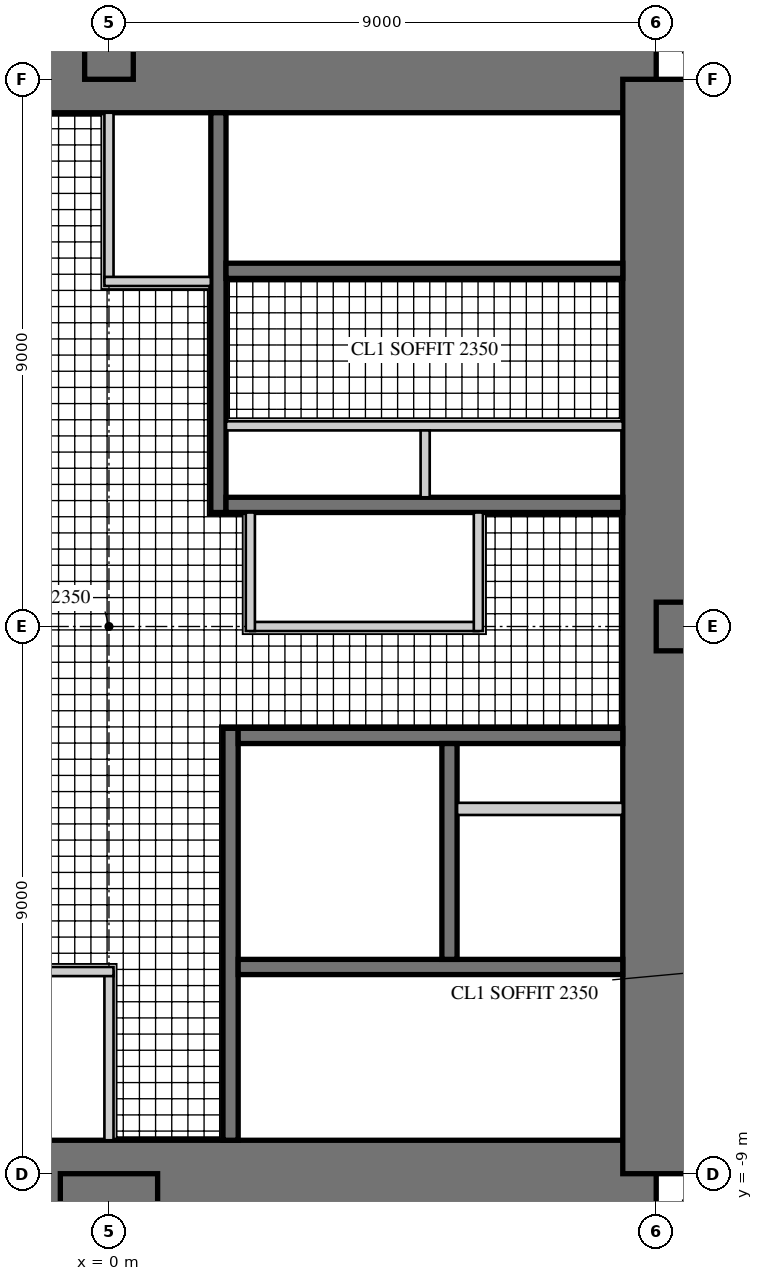
"""IFC4 building model, lengths in metres.
Left out: names, types, materials, properties, quantities, classifications, styles, units other than length and angle.
Written with IfcOpenShell. Run it as: python <this file> out.ifc"""

import sys

from ifc_helpers import new_model, si_unit, direction, frame, frame_2d, origin, place, context, subcontext, project, spatial, rectangle, extrude, element, fill, save


model = new_model("IFC4")
c1 = context("Model", 3, precision=1e-05, world=origin(), true_north=direction((0.0, 1.0)))
c2 = subcontext(c1, "Body", "Model", "MODEL_VIEW")
j1 = project(units=[si_unit("LENGTHUNIT", "METRE"), si_unit("PLANEANGLEUNIT", "RADIAN")], contexts=[c1])
p1 = place(None, origin())
s1 = spatial("IfcSite", under=j1, at=p1, CompositionType="ELEMENT")
p2 = place(p1, origin())
s2 = spatial("IfcBuilding", under=s1, at=p2, CompositionType="ELEMENT")
p3 = place(p2, frame((0.0, 0.0, 206.9)))
s3 = spatial("IfcBuildingStorey", under=s2, at=p3, CompositionType="ELEMENT", Elevation=206.9)
p4 = place(p3, frame((9.0, 9.0, 0.0), z_axis=(0.0, 0.0, 1.0), x_axis=(-1.0, 0.0, 0.0)))
e1 = element("IfcWall", 1, at=p4, inside=s3, PredefinedType="SHEAR", context=c2, shape_type="SweptSolid", body=[
    extrude(rectangle(XDim=18.0, YDim=1.1, at=frame_2d((9.0, 0.0))), origin(), (0.0, 0.0, 1.0), 3.4),
])
p5 = place(p4, frame((9.8, 0.0, 0.0)))
e2 = element("IfcOpeningElement", 2, at=p5, cuts=e1, PredefinedType="OPENING", context=c2, shape_type="SweptSolid", body=[
    extrude(rectangle(XDim=1.0, YDim=2.4, at=frame_2d((0.5, 1.2))), frame((0.0, 0.56, 0.0), z_axis=(0.0, -1.0, 0.0), x_axis=(1.0, 0.0, 0.0)), (0.0, 0.0, 1.0), 1.12),
])
p6 = place(p3, frame((-9.0, -9.0, 0.0), z_axis=(0.0, 0.0, 1.0), x_axis=(1.0, 0.0, 0.0)))
e3 = element("IfcWall", 3, at=p6, inside=s3, PredefinedType="SHEAR", context=c2, shape_type="SweptSolid", body=[
    extrude(rectangle(XDim=18.0, YDim=1.1, at=frame_2d((9.0, 0.0))), origin(), (0.0, 0.0, 1.0), 3.4),
])
p7 = place(p6, frame((9.8, 0.0, 0.0)))
e4 = element("IfcOpeningElement", 4, at=p7, cuts=e3, PredefinedType="OPENING", context=c2, shape_type="SweptSolid", body=[
    extrude(rectangle(XDim=1.0, YDim=2.4, at=frame_2d((0.5, 1.2))), frame((0.0, 0.56, 0.0), z_axis=(0.0, -1.0, 0.0), x_axis=(1.0, 0.0, 0.0)), (0.0, 0.0, 1.0), 1.12),
])
p8 = place(p3, frame((9.0, -9.0, 0.0), z_axis=(0.0, 0.0, 1.0), x_axis=(0.0, 1.0, 0.0)))
e5 = element("IfcWall", 5, at=p8, inside=s3, PredefinedType="SHEAR", context=c2, shape_type="SweptSolid", body=[
    extrude(rectangle(XDim=18.0, YDim=1.1, at=frame_2d((9.0, 0.0))), origin(), (0.0, 0.0, 1.0), 3.4),
])
p9 = place(p8, frame((9.8, 0.0, 0.0)))
e6 = element("IfcOpeningElement", 6, at=p9, cuts=e5, PredefinedType="OPENING", context=c2, shape_type="SweptSolid", body=[
    extrude(rectangle(XDim=1.0, YDim=2.4, at=frame_2d((0.5, 1.2))), frame((0.0, 0.56, 0.0), z_axis=(0.0, -1.0, 0.0), x_axis=(1.0, 0.0, 0.0)), (0.0, 0.0, 1.0), 1.12),
])
p10 = place(p3, frame((1.8, 1.875, 0.0), z_axis=(0.0, 0.0, 1.0), x_axis=(0.0, 1.0, 0.0)))
e7 = element("IfcWall", 7, at=p10, inside=s3, PredefinedType="SHEAR", context=c2, shape_type="SweptSolid", body=[
    extrude(rectangle(XDim=6.575, YDim=0.25, at=frame_2d((3.288, 0.0))), origin(), (0.0, 0.0, 1.0), 3.4),
])
p11 = place(p10, frame((1.875, 0.0, 0.0)))
e8 = element("IfcOpeningElement", 8, at=p11, cuts=e7, PredefinedType="OPENING", context=c2, shape_type="SweptSolid", body=[
    extrude(rectangle(XDim=1.6, YDim=2.4, at=frame_2d((0.8, 1.2))), frame((0.0, 0.135, 0.0), z_axis=(0.0, -1.0, 0.0), x_axis=(1.0, 0.0, 0.0)), (0.0, 0.0, 1.0), 0.27),
])
p12 = place(p3, frame((1.925, 2.0, 0.0), z_axis=(0.0, 0.0, 1.0), x_axis=(1.0, 0.0, 0.0)))
e9 = element("IfcWall", 9, at=p12, inside=s3, PredefinedType="SHEAR", context=c2, shape_type="SweptSolid", body=[
    extrude(rectangle(XDim=6.525, YDim=0.25, at=frame_2d((3.262, 0.0))), origin(), (0.0, 0.0, 1.0), 3.4),
])
p13 = place(p3, frame((1.925, 5.85, 0.0), z_axis=(0.0, 0.0, 1.0), x_axis=(1.0, 0.0, 0.0)))
e10 = element("IfcWall", 10, at=p13, inside=s3, PredefinedType="SHEAR", context=c2, shape_type="SweptSolid", body=[
    extrude(rectangle(XDim=6.525, YDim=0.25, at=frame_2d((3.262, 0.0))), origin(), (0.0, 0.0, 1.0), 3.4),
])
p14 = place(p13, frame((0.521, 0.0, 0.0)))
e11 = element("IfcOpeningElement", 11, at=p14, cuts=e10, PredefinedType="OPENING", context=c2, shape_type="SweptSolid", body=[
    extrude(rectangle(XDim=1.0, YDim=2.1, at=frame_2d((0.5, 1.05))), frame((0.0, 0.135, 0.0), z_axis=(0.0, -1.0, 0.0), x_axis=(1.0, 0.0, 0.0)), (0.0, 0.0, 1.0), 0.27),
])
p15 = place(p3, frame((1.925, 3.3, 0.0), z_axis=(0.0, 0.0, 1.0), x_axis=(1.0, 0.0, 0.0)))
e12 = element("IfcWall", 12, at=p15, inside=s3, PredefinedType="PARTITIONING", context=c2, shape_type="SweptSolid", body=[
    extrude(rectangle(XDim=6.525, YDim=0.15, at=frame_2d((3.262, 0.0))), origin(), (0.0, 0.0, 1.0), 3.4),
])
p16 = place(p15, frame((0.075, 0.0, 0.0)))
e13 = element("IfcOpeningElement", 13, at=p16, cuts=e12, PredefinedType="OPENING", context=c2, shape_type="SweptSolid", body=[
    extrude(rectangle(XDim=0.8, YDim=2.1, at=frame_2d((0.4, 1.05))), frame((0.0, 0.085, 0.0), z_axis=(0.0, -1.0, 0.0), x_axis=(1.0, 0.0, 0.0)), (0.0, 0.0, 1.0), 0.17),
])
p17 = place(p15, frame((3.675, 0.0, 0.0)))
e14 = element("IfcOpeningElement", 14, at=p17, cuts=e12, PredefinedType="OPENING", context=c2, shape_type="SweptSolid", body=[
    extrude(rectangle(XDim=0.8, YDim=2.1, at=frame_2d((0.4, 1.05))), frame((0.0, 0.085, 0.0), z_axis=(0.0, -1.0, 0.0), x_axis=(1.0, 0.0, 0.0)), (0.0, 0.0, 1.0), 0.17),
])
p18 = place(p3, frame((5.2, 2.125, 0.0), z_axis=(0.0, 0.0, 1.0), x_axis=(0.0, 1.0, 0.0)))
e15 = element("IfcWall", 15, at=p18, inside=s3, PredefinedType="PARTITIONING", context=c2, shape_type="SweptSolid", body=[
    extrude(rectangle(XDim=1.1, YDim=0.15, at=frame_2d((0.55, 0.0))), origin(), (0.0, 0.0, 1.0), 3.4),
])
p19 = place(p3, frame((2.0, -1.675, 0.0), z_axis=(0.0, 0.0, 1.0), x_axis=(0.0, -1.0, 0.0)))
e16 = element("IfcWall", 16, at=p19, inside=s3, PredefinedType="SHEAR", context=c2, shape_type="SweptSolid", body=[
    extrude(rectangle(XDim=6.775, YDim=0.25, at=frame_2d((3.387, 0.0))), origin(), (0.0, 0.0, 1.0), 3.4),
])
p20 = place(p19, frame((0.725, 0.0, 0.0)))
e17 = element("IfcOpeningElement", 17, at=p20, cuts=e16, PredefinedType="OPENING", context=c2, shape_type="SweptSolid", body=[
    extrude(rectangle(XDim=1.0, YDim=2.1, at=frame_2d((0.5, 1.05))), frame((0.0, 0.135, 0.0), z_axis=(0.0, -1.0, 0.0), x_axis=(1.0, 0.0, 0.0)), (0.0, 0.0, 1.0), 0.27),
])
p21 = place(p3, frame((2.125, -1.8, 0.0), z_axis=(0.0, 0.0, 1.0), x_axis=(1.0, 0.0, 0.0)))
e18 = element("IfcWall", 18, at=p21, inside=s3, PredefinedType="SHEAR", context=c2, shape_type="SweptSolid", body=[
    extrude(rectangle(XDim=6.325, YDim=0.25, at=frame_2d((3.163, 0.0))), origin(), (0.0, 0.0, 1.0), 3.4),
])
p22 = place(p3, frame((2.125, -5.6, 0.0), z_axis=(0.0, 0.0, 1.0), x_axis=(1.0, 0.0, 0.0)))
e19 = element("IfcWall", 19, at=p22, inside=s3, PredefinedType="SHEAR", context=c2, shape_type="SweptSolid", body=[
    extrude(rectangle(XDim=6.325, YDim=0.25, at=frame_2d((3.163, 0.0))), origin(), (0.0, 0.0, 1.0), 3.4),
])
p23 = place(p22, frame((0.175, 0.0, 0.0)))
e20 = element("IfcOpeningElement", 20, at=p23, cuts=e19, PredefinedType="OPENING", context=c2, shape_type="SweptSolid", body=[
    extrude(rectangle(XDim=1.0, YDim=2.1, at=frame_2d((0.5, 1.05))), frame((0.0, 0.135, 0.0), z_axis=(0.0, -1.0, 0.0), x_axis=(1.0, 0.0, 0.0)), (0.0, 0.0, 1.0), 0.27),
])
p24 = place(p3, frame((5.6, -1.925, 0.0), z_axis=(0.0, 0.0, 1.0), x_axis=(0.0, -1.0, 0.0)))
e21 = element("IfcWall", 21, at=p24, inside=s3, PredefinedType="SHEAR", context=c2, shape_type="SweptSolid", body=[
    extrude(rectangle(XDim=3.55, YDim=0.25, at=frame_2d((1.775, 0.0))), origin(), (0.0, 0.0, 1.0), 3.4),
])
p25 = place(p24, frame((1.525, 0.0, 0.0)))
e22 = element("IfcOpeningElement", 22, at=p25, cuts=e21, PredefinedType="OPENING", context=c2, shape_type="SweptSolid", body=[
    extrude(rectangle(XDim=1.1, YDim=2.2, at=frame_2d((0.55, 1.1))), frame((0.0, 0.135, 0.0), z_axis=(0.0, -1.0, 0.0), x_axis=(1.0, 0.0, 0.0)), (0.0, 0.0, 1.0), 0.27),
])
p26 = place(p24, frame((0.075, 0.0, 0.0)))
e23 = element("IfcOpeningElement", 23, at=p26, cuts=e21, PredefinedType="OPENING", context=c2, shape_type="SweptSolid", body=[
    extrude(rectangle(XDim=0.8, YDim=2.1, at=frame_2d((0.4, 1.05))), frame((0.0, 0.135, 0.0), z_axis=(0.0, -1.0, 0.0), x_axis=(1.0, 0.0, 0.0)), (0.0, 0.0, 1.0), 0.27),
])
p27 = place(p3, frame((5.725, -3.0, 0.0), z_axis=(0.0, 0.0, 1.0), x_axis=(1.0, 0.0, 0.0)))
e24 = element("IfcWall", 24, at=p27, inside=s3, PredefinedType="PARTITIONING", context=c2, shape_type="SweptSolid", body=[
    extrude(rectangle(XDim=2.725, YDim=0.2, at=frame_2d((1.362, 0.0))), origin(), (0.0, 0.0, 1.0), 3.4),
])
p28 = place(p3, frame((0.0, 9.0, 0.0), z_axis=(0.0, 0.0, 1.0), x_axis=(0.0, 1.0, 0.0)))
e25 = element("IfcWall", 25, at=p28, inside=s3, PredefinedType="SHEAR", context=c2, shape_type="SweptSolid", body=[
    extrude(rectangle(XDim=9.0, YDim=0.8, at=frame_2d((4.5, 0.0))), origin(), (0.0, 0.0, 1.0), 3.4),
])
p29 = place(p28, frame((3.95, 0.0, 0.0)))
e26 = element("IfcOpeningElement", 26, at=p29, cuts=e25, PredefinedType="OPENING", context=c2, shape_type="SweptSolid", body=[
    extrude(rectangle(XDim=1.0, YDim=2.15, at=frame_2d((0.5, 1.075))), frame((0.0, 0.41, 0.0), z_axis=(0.0, -1.0, 0.0), x_axis=(1.0, 0.0, 0.0)), (0.0, 0.0, 1.0), 0.82),
])
p30 = place(p28, frame((7.0, 0.0, 0.0)))
e27 = element("IfcOpeningElement", 27, at=p30, cuts=e25, PredefinedType="OPENING", context=c2, shape_type="SweptSolid", body=[
    extrude(rectangle(XDim=1.0, YDim=2.2, at=frame_2d((0.5, 1.1))), frame((0.0, 0.41, 0.0), z_axis=(0.0, -1.0, 0.0), x_axis=(1.0, 0.0, 0.0)), (0.0, 0.0, 1.0), 0.82),
])
p31 = place(p3, frame((9.0, 0.0, 0.0), z_axis=(0.0, 0.0, 1.0), x_axis=(1.0, 0.0, 0.0)))
e28 = element("IfcWall", 28, at=p31, inside=s3, PredefinedType="SHEAR", context=c2, shape_type="SweptSolid", body=[
    extrude(rectangle(XDim=9.0, YDim=0.8, at=frame_2d((4.5, 0.0))), origin(), (0.0, 0.0, 1.0), 3.4),
])
p32 = place(p31, frame((3.95, 0.0, 0.0)))
e29 = element("IfcOpeningElement", 29, at=p32, cuts=e28, PredefinedType="OPENING", context=c2, shape_type="SweptSolid", body=[
    extrude(rectangle(XDim=1.0, YDim=2.15, at=frame_2d((0.5, 1.075))), frame((0.0, 0.41, 0.0), z_axis=(0.0, -1.0, 0.0), x_axis=(1.0, 0.0, 0.0)), (0.0, 0.0, 1.0), 0.82),
])
p33 = place(p31, frame((7.0, 0.0, 0.0)))
e30 = element("IfcOpeningElement", 30, at=p33, cuts=e28, PredefinedType="OPENING", context=c2, shape_type="SweptSolid", body=[
    extrude(rectangle(XDim=1.0, YDim=2.2, at=frame_2d((0.5, 1.1))), frame((0.0, 0.41, 0.0), z_axis=(0.0, -1.0, 0.0), x_axis=(1.0, 0.0, 0.0)), (0.0, 0.0, 1.0), 0.82),
])
p34 = place(p3, frame((0.0, -9.0, 0.0), z_axis=(0.0, 0.0, 1.0), x_axis=(0.0, -1.0, 0.0)))
e31 = element("IfcWall", 31, at=p34, inside=s3, PredefinedType="SHEAR", context=c2, shape_type="SweptSolid", body=[
    extrude(rectangle(XDim=4.05, YDim=1.6, at=frame_2d((2.025, 0.0))), origin(), (0.0, 0.0, 1.0), 3.4),
])
p35 = place(p3, frame((9.445, -9.57, 0.0), z_axis=(0.0, 0.0, 1.0), x_axis=(1.0, 0.0, 0.0)))
e32 = element("IfcWall", 32, at=p35, inside=s3, PredefinedType="SOLIDWALL", context=c2, shape_type="SweptSolid", body=[
    extrude(rectangle(XDim=3.125, YDim=0.25, at=frame_2d((1.562, 0.0))), origin(), (0.0, 0.0, 1.0), 3.22),
])
p36 = place(p35, frame((0.6, 0.0, 0.0)))
e33 = element("IfcOpeningElement", 33, at=p36, cuts=e32, PredefinedType="OPENING", context=c2, shape_type="SweptSolid", body=[
    extrude(rectangle(XDim=1.0, YDim=2.2, at=frame_2d((0.5, 1.1))), frame((0.0, 0.135, 0.0), z_axis=(0.0, -1.0, 0.0), x_axis=(1.0, 0.0, 0.0)), (0.0, 0.0, 1.0), 0.27),
])
p37 = place(p3, frame((9.57, 9.445, 0.0), z_axis=(0.0, 0.0, 1.0), x_axis=(0.0, 1.0, 0.0)))
e34 = element("IfcWall", 34, at=p37, inside=s3, PredefinedType="SOLIDWALL", context=c2, shape_type="SweptSolid", body=[
    extrude(rectangle(XDim=3.125, YDim=0.25, at=frame_2d((1.562, 0.0))), origin(), (0.0, 0.0, 1.0), 3.22),
])
p38 = place(p37, frame((0.6, 0.0, 0.0)))
e35 = element("IfcOpeningElement", 35, at=p38, cuts=e34, PredefinedType="OPENING", context=c2, shape_type="SweptSolid", body=[
    extrude(rectangle(XDim=1.0, YDim=2.2, at=frame_2d((0.5, 1.1))), frame((0.0, 0.135, 0.0), z_axis=(0.0, -1.0, 0.0), x_axis=(1.0, 0.0, 0.0)), (0.0, 0.0, 1.0), 0.27),
])
p39 = place(p3, frame((2.325, 0.0, 0.0), z_axis=(0.0, 0.0, 1.0), x_axis=(1.0, 0.0, 0.0)))
e36 = element("IfcWall", 36, at=p39, inside=s3, PredefinedType="PARTITIONING", context=c2, shape_type="SweptSolid", body=[
    extrude(rectangle(XDim=3.75, YDim=0.15, at=frame_2d((1.875, 0.0))), origin(), (0.0, 0.0, 1.0), 3.22),
])
p40 = place(p39, frame((0.4, 0.0, 0.0)))
e37 = element("IfcOpeningElement", 37, at=p40, cuts=e36, PredefinedType="OPENING", context=c2, shape_type="SweptSolid", body=[
    extrude(rectangle(XDim=1.0, YDim=2.1, at=frame_2d((0.5, 1.05))), frame((0.0, 0.085, 0.0), z_axis=(0.0, -1.0, 0.0), x_axis=(1.0, 0.0, 0.0)), (0.0, 0.0, 1.0), 0.17),
])
for number, where, z_axis, x_axis in (
    (38, (2.325, 1.875, 0.0), (0.0, 0.0, 1.0), (0.0, -1.0, 0.0)),
    (39, (6.075, -0.075, 0.0), (0.0, 0.0, 1.0), (0.0, 1.0, 0.0)),
):
    element("IfcWall", number, at=place(p3, frame(where, z_axis=z_axis, x_axis=x_axis)), inside=s3, PredefinedType="PARTITIONING", context=c2, shape_type="SweptSolid", body=[
        extrude(rectangle(XDim=1.95, YDim=0.15, at=frame_2d((0.975, 0.0))), origin(), (0.0, 0.0, 1.0), 3.22),
    ])
p41 = place(p3, frame((0.0, 5.675, 0.0), z_axis=(0.0, 0.0, 1.0), x_axis=(0.0, 1.0, 0.0)))
e40 = element("IfcWall", 40, at=p41, inside=s3, PredefinedType="PARTITIONING", context=c2, shape_type="SweptSolid", body=[
    extrude(rectangle(XDim=2.775, YDim=0.15, at=frame_2d((1.387, 0.0))), origin(), (0.0, 0.0, 1.0), 3.22),
])
p42 = place(p41, frame((0.4, 0.0, 0.0)))
e41 = element("IfcOpeningElement", 41, at=p42, cuts=e40, PredefinedType="OPENING", context=c2, shape_type="SweptSolid", body=[
    extrude(rectangle(XDim=1.0, YDim=2.1, at=frame_2d((0.5, 1.05))), frame((0.0, 0.085, 0.0), z_axis=(0.0, -1.0, 0.0), x_axis=(1.0, 0.0, 0.0)), (0.0, 0.0, 1.0), 0.17),
])
p43 = place(p3, frame((1.675, 5.675, 0.0), z_axis=(0.0, 0.0, 1.0), x_axis=(-1.0, 0.0, 0.0)))
e42 = element("IfcWall", 42, at=p43, inside=s3, PredefinedType="PARTITIONING", context=c2, shape_type="SweptSolid", body=[
    extrude(rectangle(XDim=1.75, YDim=0.15, at=frame_2d((0.875, 0.0))), origin(), (0.0, 0.0, 1.0), 3.22),
])
p44 = place(p3, frame((0.0, -5.675, 0.0), z_axis=(0.0, 0.0, 1.0), x_axis=(0.0, -1.0, 0.0)))
e43 = element("IfcWall", 43, at=p44, inside=s3, PredefinedType="PARTITIONING", context=c2, shape_type="SweptSolid", body=[
    extrude(rectangle(XDim=2.775, YDim=0.15, at=frame_2d((1.387, 0.0))), origin(), (0.0, 0.0, 1.0), 3.22),
])
p45 = place(p44, frame((0.4, 0.0, 0.0)))
e44 = element("IfcOpeningElement", 44, at=p45, cuts=e43, PredefinedType="OPENING", context=c2, shape_type="SweptSolid", body=[
    extrude(rectangle(XDim=1.0, YDim=2.1, at=frame_2d((0.5, 1.05))), frame((0.0, 0.085, 0.0), z_axis=(0.0, -1.0, 0.0), x_axis=(1.0, 0.0, 0.0)), (0.0, 0.0, 1.0), 0.17),
])
p46 = place(p3, frame((-1.675, -5.675, 0.0), z_axis=(0.0, 0.0, 1.0), x_axis=(1.0, 0.0, 0.0)))
e45 = element("IfcWall", 45, at=p46, inside=s3, PredefinedType="PARTITIONING", context=c2, shape_type="SweptSolid", body=[
    extrude(rectangle(XDim=1.75, YDim=0.15, at=frame_2d((0.875, 0.0))), origin(), (0.0, 0.0, 1.0), 3.22),
])
p47 = place(p40, origin())
e46 = element("IfcDoor", 46, at=p47, inside=s3, OperationType="SINGLE_SWING_LEFT", PredefinedType="DOOR", context=c2, shape_type="SweptSolid", body=[
    extrude(rectangle(XDim=1.0, YDim=2.1, at=frame_2d((0.5, 1.05))), frame((0.0, 0.025, 0.0), z_axis=(0.0, -1.0, 0.0), x_axis=(1.0, 0.0, 0.0)), (0.0, 0.0, 1.0), 0.05),
])
fill(e37, e46)
p48 = place(p42, frame((1.0, 0.0, 0.0), z_axis=(0.0, 0.0, 1.0), x_axis=(-1.0, 0.0, 0.0)))
e47 = element("IfcDoor", 47, at=p48, inside=s3, OperationType="SINGLE_SWING_RIGHT", PredefinedType="DOOR", context=c2, shape_type="SweptSolid", body=[
    extrude(rectangle(XDim=1.0, YDim=2.1, at=frame_2d((0.5, 1.05))), frame((0.0, 0.025, 0.0), z_axis=(0.0, -1.0, 0.0), x_axis=(1.0, 0.0, 0.0)), (0.0, 0.0, 1.0), 0.05),
])
fill(e41, e47)
p49 = place(p45, frame((1.0, 0.0, 0.0), z_axis=(0.0, 0.0, 1.0), x_axis=(-1.0, 0.0, 0.0)))
e48 = element("IfcDoor", 48, at=p49, inside=s3, OperationType="SINGLE_SWING_RIGHT", PredefinedType="DOOR", context=c2, shape_type="SweptSolid", body=[
    extrude(rectangle(XDim=1.0, YDim=2.1, at=frame_2d((0.5, 1.05))), frame((0.0, 0.025, 0.0), z_axis=(0.0, -1.0, 0.0), x_axis=(1.0, 0.0, 0.0)), (0.0, 0.0, 1.0), 0.05),
])
fill(e44, e48)
p50 = place(p5, origin())
e49 = element("IfcDoor", 49, at=p50, inside=s3, OperationType="SINGLE_SWING_RIGHT", PredefinedType="DOOR", context=c2, shape_type="SweptSolid", body=[
    extrude(rectangle(XDim=1.0, YDim=2.4, at=frame_2d((0.5, 1.2))), frame((0.0, 0.055, 0.0), z_axis=(0.0, -1.0, 0.0), x_axis=(1.0, 0.0, 0.0)), (0.0, 0.0, 1.0), 0.05),
])
fill(e2, e49)
p51 = place(p7, origin())
e50 = element("IfcDoor", 50, at=p51, inside=s3, OperationType="SINGLE_SWING_RIGHT", PredefinedType="DOOR", context=c2, shape_type="SweptSolid", body=[
    extrude(rectangle(XDim=1.0, YDim=2.4, at=frame_2d((0.5, 1.2))), frame((0.0, 0.055, 0.0), z_axis=(0.0, -1.0, 0.0), x_axis=(1.0, 0.0, 0.0)), (0.0, 0.0, 1.0), 0.05),
])
fill(e4, e50)
p52 = place(p9, origin())
e51 = element("IfcDoor", 51, at=p52, inside=s3, OperationType="SINGLE_SWING_RIGHT", PredefinedType="DOOR", context=c2, shape_type="SweptSolid", body=[
    extrude(rectangle(XDim=1.0, YDim=2.4, at=frame_2d((0.5, 1.2))), frame((0.0, 0.055, 0.0), z_axis=(0.0, -1.0, 0.0), x_axis=(1.0, 0.0, 0.0)), (0.0, 0.0, 1.0), 0.05),
])
fill(e6, e51)
p53 = place(p11, frame((1.6, 0.0, 0.0), z_axis=(0.0, 0.0, 1.0), x_axis=(-1.0, 0.0, 0.0)))
e52 = element("IfcDoor", 52, at=p53, inside=s3, OperationType="DOUBLE_DOOR_SINGLE_SWING", PredefinedType="DOOR", context=c2, shape_type="SweptSolid", body=[
    extrude(rectangle(XDim=1.6, YDim=2.4, at=frame_2d((0.8, 1.2))), frame((0.0, 0.025, 0.0), z_axis=(0.0, -1.0, 0.0), x_axis=(1.0, 0.0, 0.0)), (0.0, 0.0, 1.0), 0.05),
])
fill(e8, e52)
p54 = place(p16, frame((0.8, 0.0, 0.0), z_axis=(0.0, 0.0, 1.0), x_axis=(-1.0, 0.0, 0.0)))
e53 = element("IfcDoor", 53, at=p54, inside=s3, OperationType="SINGLE_SWING_RIGHT", PredefinedType="DOOR", context=c2, shape_type="SweptSolid", body=[
    extrude(rectangle(XDim=0.8, YDim=2.1, at=frame_2d((0.4, 1.05))), frame((0.0, 0.025, 0.0), z_axis=(0.0, -1.0, 0.0), x_axis=(1.0, 0.0, 0.0)), (0.0, 0.0, 1.0), 0.05),
])
fill(e13, e53)
p55 = place(p17, frame((0.8, 0.0, 0.0), z_axis=(0.0, 0.0, 1.0), x_axis=(-1.0, 0.0, 0.0)))
e54 = element("IfcDoor", 54, at=p55, inside=s3, OperationType="SINGLE_SWING_RIGHT", PredefinedType="DOOR", context=c2, shape_type="SweptSolid", body=[
    extrude(rectangle(XDim=0.8, YDim=2.1, at=frame_2d((0.4, 1.05))), frame((0.0, 0.025, 0.0), z_axis=(0.0, -1.0, 0.0), x_axis=(1.0, 0.0, 0.0)), (0.0, 0.0, 1.0), 0.05),
])
fill(e14, e54)
p56 = place(p20, origin())
e55 = element("IfcDoor", 55, at=p56, inside=s3, OperationType="SINGLE_SWING_LEFT", PredefinedType="DOOR", context=c2, shape_type="SweptSolid", body=[
    extrude(rectangle(XDim=1.0, YDim=2.1, at=frame_2d((0.5, 1.05))), frame((0.0, 0.025, 0.0), z_axis=(0.0, -1.0, 0.0), x_axis=(1.0, 0.0, 0.0)), (0.0, 0.0, 1.0), 0.05),
])
fill(e17, e55)
p57 = place(p23, frame((1.0, 0.0, 0.0), z_axis=(0.0, 0.0, 1.0), x_axis=(-1.0, 0.0, 0.0)))
e56 = element("IfcDoor", 56, at=p57, inside=s3, OperationType="SINGLE_SWING_RIGHT", PredefinedType="DOOR", context=c2, shape_type="SweptSolid", body=[
    extrude(rectangle(XDim=1.0, YDim=2.1, at=frame_2d((0.5, 1.05))), frame((0.0, 0.025, 0.0), z_axis=(0.0, -1.0, 0.0), x_axis=(1.0, 0.0, 0.0)), (0.0, 0.0, 1.0), 0.05),
])
fill(e20, e56)
p58 = place(p25, origin())
e57 = element("IfcDoor", 57, at=p58, inside=s3, OperationType="DOUBLE_DOOR_SLIDING", PredefinedType="DOOR", context=c2, shape_type="SweptSolid", body=[
    extrude(rectangle(XDim=1.1, YDim=2.2, at=frame_2d((0.55, 1.1))), frame((0.0, 0.025, 0.0), z_axis=(0.0, -1.0, 0.0), x_axis=(1.0, 0.0, 0.0)), (0.0, 0.0, 1.0), 0.05),
])
fill(e22, e57)
p59 = place(p26, origin())
e58 = element("IfcDoor", 58, at=p59, inside=s3, OperationType="SINGLE_SWING_LEFT", PredefinedType="DOOR", context=c2, shape_type="SweptSolid", body=[
    extrude(rectangle(XDim=0.8, YDim=2.1, at=frame_2d((0.4, 1.05))), frame((0.0, 0.025, 0.0), z_axis=(0.0, -1.0, 0.0), x_axis=(1.0, 0.0, 0.0)), (0.0, 0.0, 1.0), 0.05),
])
fill(e23, e58)
p60 = place(p14, origin())
e59 = element("IfcDoor", 59, at=p60, inside=s3, OperationType="SINGLE_SWING_LEFT", PredefinedType="DOOR", context=c2, shape_type="SweptSolid", body=[
    extrude(rectangle(XDim=1.0, YDim=2.1, at=frame_2d((0.5, 1.05))), frame((0.0, 0.025, 0.0), z_axis=(0.0, -1.0, 0.0), x_axis=(1.0, 0.0, 0.0)), (0.0, 0.0, 1.0), 0.05),
])
fill(e11, e59)
save(model, sys.argv[1])
